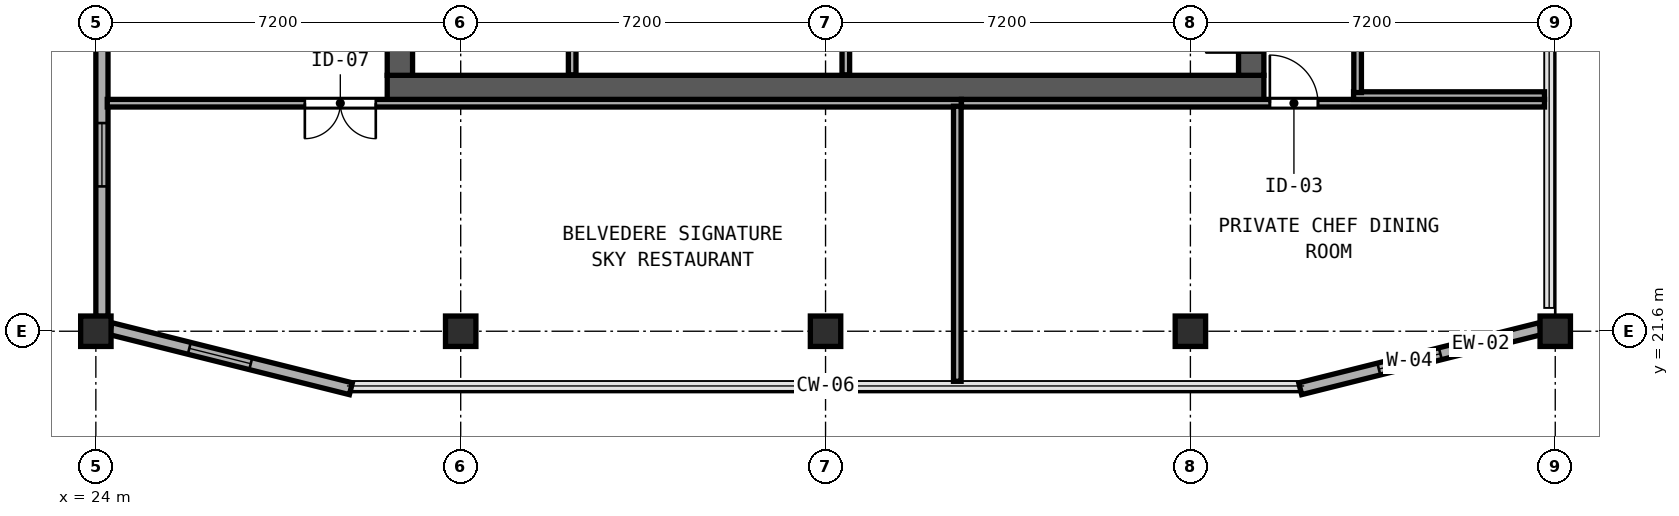
"""IFC4 building model, lengths in metres.
Left out: names, types, materials, properties, quantities, classifications, styles, units other than length and angle.
Written with IfcOpenShell. Run it as: python <this file> out.ifc"""

import sys

from ifc_helpers import new_model, si_unit, direction, frame, frame_2d, origin, origin_2d, place, context, subcontext, project, spatial, rectangle, hollow_rectangle, extrude, element, fill, save


model = new_model("IFC4")
c1 = context("Model", 3, precision=1e-05, world=origin(), true_north=direction((0.0, 1.0)))
c2 = subcontext(c1, "Body", "Model", "MODEL_VIEW")
j1 = project(units=[si_unit("LENGTHUNIT", "METRE"), si_unit("PLANEANGLEUNIT", "RADIAN")], contexts=[c1])
p1 = place(None, origin())
s1 = spatial("IfcSite", under=j1, at=p1, CompositionType="ELEMENT")
p2 = place(p1, origin())
s2 = spatial("IfcBuilding", under=s1, at=p2, CompositionType="ELEMENT")
p3 = place(p2, frame((0.0, 0.0, 313.4)))
s3 = spatial("IfcBuildingStorey", under=s2, at=p3, CompositionType="ELEMENT", Elevation=313.4)
p4 = place(p3, frame((29.75, 26.4, 0.0), z_axis=(0.0, 0.0, 1.0), x_axis=(1.0, 0.0, 0.0)))
e1 = element("IfcWall", 1, at=p4, inside=s3, PredefinedType="SHEAR", context=c2, shape_type="SweptSolid", body=[
    extrude(rectangle(XDim=17.3, YDim=0.5, at=frame_2d((8.65, 0.0))), origin(), (0.0, 0.0, 1.0), 4.56),
])
p5 = place(p3, frame((30.0, 26.65, 0.0), z_axis=(0.0, 0.0, 1.0), x_axis=(0.0, 1.0, 0.0)))
e2 = element("IfcWall", 2, at=p5, inside=s3, PredefinedType="SHEAR", context=c2, shape_type="SweptSolid", body=[
    extrude(rectangle(XDim=4.2, YDim=0.5, at=frame_2d((2.1, 0.0))), origin(), (0.0, 0.0, 1.0), 4.56),
])
p6 = place(p3, frame((46.8, 26.65, 0.0), z_axis=(0.0, 0.0, 1.0), x_axis=(0.0, 1.0, 0.0)))
e3 = element("IfcWall", 3, at=p6, inside=s3, PredefinedType="SHEAR", context=c2, shape_type="SweptSolid", body=[
    extrude(rectangle(XDim=4.2, YDim=0.5, at=frame_2d((2.1, 0.0))), origin(), (0.0, 0.0, 1.0), 4.56),
])
p7 = place(p6, frame((1.35, 0.0, 0.0), z_axis=(0.0, 0.0, 1.0), x_axis=(-1.0, 0.0, 0.0)))
e4 = element("IfcOpeningElement", 4, at=p7, cuts=e3, PredefinedType="OPENING", context=c2, shape_type="SweptSolid", body=[
    extrude(rectangle(XDim=0.9, YDim=2.1, at=frame_2d((0.45, 1.05))), frame((0.0, 0.26, 0.0), z_axis=(0.0, -1.0, 0.0), x_axis=(1.0, 0.0, 0.0)), (0.0, 0.0, 1.0), 0.52),
])
for number, where, z_axis, x_axis in (
    (5, (24.0, 21.6, 0.0), (0.0, 0.0, 1.0), (1.0, 0.0, 0.0)),
    (6, (52.8, 21.6, 0.0), (0.0, 0.0, 1.0), (1.0, 0.0, 0.0)),
    (7, (31.2, 21.6, 0.0), (0.0, 0.0, 1.0), (1.0, 0.0, 0.0)),
    (8, (45.6, 21.6, 0.0), (0.0, 0.0, 1.0), (1.0, 0.0, 0.0)),
    (9, (38.4, 21.6, 0.0), (0.0, 0.0, 1.0), (1.0, 0.0, 0.0)),
):
    element("IfcColumn", number, at=place(p3, frame(where, z_axis=z_axis, x_axis=x_axis)), inside=s3, PredefinedType="COLUMN", context=c2, shape_type="SweptSolid", body=[
        extrude(hollow_rectangle(XDim=0.6, YDim=0.6, WallThickness=0.024, at=origin_2d()), origin(), (0.0, 0.0, 1.0), 4.8),
    ])
p8 = place(p3, frame((47.767, 20.465, 0.0), z_axis=(0.0, 0.0, 1.0), x_axis=(0.970142500145, 0.242535625036, 0.0)))
e10 = element("IfcWall", 10, at=p8, inside=s3, PredefinedType="SOLIDWALL", context=c2, shape_type="SweptSolid", body=[
    extrude(rectangle(XDim=4.887, YDim=0.24, at=frame_2d((2.444, 0.0))), origin(), (0.0, 0.0, 1.0), 4.155),
])
p9 = place(p8, frame((1.6, 0.0, 0.85)))
e11 = element("IfcOpeningElement", 11, at=p9, cuts=e10, PredefinedType="OPENING", context=c2, shape_type="SweptSolid", body=[
    extrude(rectangle(XDim=1.25, YDim=1.95, at=frame_2d((0.625, 0.975))), frame((0.0, 0.13, 0.0), z_axis=(0.0, -1.0, 0.0), x_axis=(1.0, 0.0, 0.0)), (0.0, 0.0, 1.0), 0.26),
])
p10 = place(p3, frame((24.12, 27.308, 0.0), z_axis=(0.0, 0.0, 1.0), x_axis=(0.0, -1.0, 0.0)))
e12 = element("IfcWall", 12, at=p10, inside=s3, PredefinedType="SOLIDWALL", context=c2, shape_type="SweptSolid", body=[
    extrude(rectangle(XDim=5.416, YDim=0.24, at=frame_2d((2.708, 0.0))), origin(), (0.0, 0.0, 1.0), 4.155),
])
p11 = place(p10, frame((1.6, 0.0, 0.85)))
e13 = element("IfcOpeningElement", 13, at=p11, cuts=e12, PredefinedType="OPENING", context=c2, shape_type="SweptSolid", body=[
    extrude(rectangle(XDim=1.25, YDim=1.95, at=frame_2d((0.625, 0.975))), frame((0.0, 0.13, 0.0), z_axis=(0.0, -1.0, 0.0), x_axis=(1.0, 0.0, 0.0)), (0.0, 0.0, 1.0), 0.26),
])
p12 = place(p3, frame((24.292, 21.651, 0.0), z_axis=(0.0, 0.0, 1.0), x_axis=(0.970142500145, -0.242535625036, 0.0)))
e14 = element("IfcWall", 14, at=p12, inside=s3, PredefinedType="SOLIDWALL", context=c2, shape_type="SweptSolid", body=[
    extrude(rectangle(XDim=4.887, YDim=0.24, at=frame_2d((2.444, 0.0))), origin(), (0.0, 0.0, 1.0), 4.155),
])
p13 = place(p12, frame((1.6, 0.0, 0.85)))
e15 = element("IfcOpeningElement", 15, at=p13, cuts=e14, PredefinedType="OPENING", context=c2, shape_type="SweptSolid", body=[
    extrude(rectangle(XDim=1.25, YDim=1.95, at=frame_2d((0.625, 0.975))), frame((0.0, 0.13, 0.0), z_axis=(0.0, -1.0, 0.0), x_axis=(1.0, 0.0, 0.0)), (0.0, 0.0, 1.0), 0.26),
])
p14 = place(p3, frame((38.8, 26.66, 0.0), z_axis=(0.0, 0.0, 1.0), x_axis=(0.0, 1.0, 0.0)))
e16 = element("IfcWall", 16, at=p14, inside=s3, PredefinedType="SOLIDWALL", context=c2, shape_type="SweptSolid", body=[
    extrude(rectangle(XDim=4.075, YDim=0.15, at=frame_2d((2.038, 0.0))), origin(), (0.0, 0.0, 1.0), 4.56),
])
p15 = place(p3, frame((33.4, 26.66, 0.0), z_axis=(0.0, 0.0, 1.0), x_axis=(0.0, 1.0, 0.0)))
e17 = element("IfcWall", 17, at=p15, inside=s3, PredefinedType="PARTITIONING", context=c2, shape_type="SweptSolid", body=[
    extrude(rectangle(XDim=4.075, YDim=0.15, at=frame_2d((2.038, 0.0))), origin(), (0.0, 0.0, 1.0), 4.56),
])
p16 = place(p3, frame((24.225, 26.1, 0.0), z_axis=(0.0, 0.0, 1.0), x_axis=(1.0, 0.0, 0.0)))
e18 = element("IfcWall", 18, at=p16, inside=s3, PredefinedType="PARTITIONING", context=c2, shape_type="SweptSolid", body=[
    extrude(rectangle(XDim=16.855, YDim=0.15, at=frame_2d((8.427, 0.0))), origin(), (0.0, 0.0, 1.0), 4.56),
])
p17 = place(p16, frame((5.299, 0.0, 0.0), z_axis=(0.0, 0.0, 1.0), x_axis=(-1.0, 0.0, 0.0)))
e19 = element("IfcOpeningElement", 19, at=p17, cuts=e18, PredefinedType="OPENING", context=c2, shape_type="SweptSolid", body=[
    extrude(rectangle(XDim=1.4, YDim=2.18, at=frame_2d((0.7, 1.09))), frame((0.0, 0.085, 0.0), z_axis=(0.0, -1.0, 0.0), x_axis=(1.0, 0.0, 0.0)), (0.0, 0.0, 1.0), 0.17),
])
p18 = place(p3, frame((41.0, 20.612, 0.0), z_axis=(0.0, 0.0, 1.0), x_axis=(0.0, 1.0, 0.0)))
e20 = element("IfcWall", 20, at=p18, inside=s3, PredefinedType="PARTITIONING", context=c2, shape_type="SweptSolid", body=[
    extrude(rectangle(XDim=5.428, YDim=0.15, at=frame_2d((2.714, 0.0))), origin(), (0.0, 0.0, 1.0), 4.56),
])
p19 = place(p3, frame((41.082, 26.1, 0.0), z_axis=(0.0, 0.0, 1.0), x_axis=(1.0, 0.0, 0.0)))
e21 = element("IfcWall", 21, at=p19, inside=s3, PredefinedType="PARTITIONING", context=c2, shape_type="SweptSolid", body=[
    extrude(rectangle(XDim=11.506, YDim=0.15, at=frame_2d((5.753, 0.0))), origin(), (0.0, 0.0, 1.0), 4.56),
])
p20 = place(p19, frame((7.036, 0.0, 0.0), z_axis=(0.0, 0.0, 1.0), x_axis=(-1.0, 0.0, 0.0)))
e22 = element("IfcOpeningElement", 22, at=p20, cuts=e21, PredefinedType="OPENING", context=c2, shape_type="SweptSolid", body=[
    extrude(rectangle(XDim=0.95, YDim=2.12, at=frame_2d((0.475, 1.06))), frame((0.0, 0.085, 0.0), z_axis=(0.0, -1.0, 0.0), x_axis=(1.0, 0.0, 0.0)), (0.0, 0.0, 1.0), 0.17),
])
p21 = place(p3, frame((48.82, 26.25, 0.0), z_axis=(0.0, 0.0, 1.0), x_axis=(1.0, 0.0, 0.0)))
e23 = element("IfcWall", 23, at=p21, inside=s3, PredefinedType="PARTITIONING", context=c2, shape_type="SweptSolid", body=[
    extrude(rectangle(XDim=3.768, YDim=0.15, at=frame_2d((1.884, 0.0))), origin(), (0.0, 0.0, 1.0), 4.56),
])
p22 = place(p3, frame((48.9, 26.31, 0.0), z_axis=(0.0, 0.0, 1.0), x_axis=(0.0, 1.0, 0.0)))
e24 = element("IfcWall", 24, at=p22, inside=s3, PredefinedType="PARTITIONING", context=c2, shape_type="SweptSolid", body=[
    extrude(rectangle(XDim=21.68, YDim=0.15, at=frame_2d((10.84, 0.0))), origin(), (0.0, 0.0, 1.0), 4.56),
])
p23 = place(p22, frame((5.86, 0.0, 0.0)))
e25 = element("IfcOpeningElement", 25, at=p23, cuts=e24, PredefinedType="OPENING", context=c2, shape_type="SweptSolid", body=[
    extrude(rectangle(XDim=0.95, YDim=2.12, at=frame_2d((0.475, 1.06))), frame((0.0, 0.085, 0.0), z_axis=(0.0, -1.0, 0.0), x_axis=(1.0, 0.0, 0.0)), (0.0, 0.0, 1.0), 0.17),
])
p24 = place(p9, origin())
e26 = element("IfcWindow", 26, at=p24, inside=s3, PartitioningType="SINGLE_PANEL", PredefinedType="WINDOW", context=c2, shape_type="SweptSolid", body=[
    extrude(rectangle(XDim=1.25, YDim=1.95, at=frame_2d((0.625, 0.975))), frame((0.0, 0.03, 0.0), z_axis=(0.0, -1.0, 0.0), x_axis=(1.0, 0.0, 0.0)), (0.0, 0.0, 1.0), 0.06),
])
fill(e11, e26)
p25 = place(p11, origin())
e27 = element("IfcWindow", 27, at=p25, inside=s3, PartitioningType="SINGLE_PANEL", PredefinedType="WINDOW", context=c2, shape_type="SweptSolid", body=[
    extrude(rectangle(XDim=1.25, YDim=1.95, at=frame_2d((0.625, 0.975))), frame((0.0, 0.03, 0.0), z_axis=(0.0, -1.0, 0.0), x_axis=(1.0, 0.0, 0.0)), (0.0, 0.0, 1.0), 0.06),
])
fill(e13, e27)
p26 = place(p13, origin())
e28 = element("IfcWindow", 28, at=p26, inside=s3, PartitioningType="SINGLE_PANEL", PredefinedType="WINDOW", context=c2, shape_type="SweptSolid", body=[
    extrude(rectangle(XDim=1.25, YDim=1.95, at=frame_2d((0.625, 0.975))), frame((0.0, 0.03, 0.0), z_axis=(0.0, -1.0, 0.0), x_axis=(1.0, 0.0, 0.0)), (0.0, 0.0, 1.0), 0.06),
])
fill(e15, e28)
p27 = place(p7, origin())
e29 = element("IfcDoor", 29, at=p27, inside=s3, OperationType="SINGLE_SWING_RIGHT", PredefinedType="DOOR", context=c2, shape_type="SweptSolid", body=[
    extrude(rectangle(XDim=0.9, YDim=2.1, at=frame_2d((0.45, 1.05))), frame((0.0, -0.135, 0.0), z_axis=(0.0, -1.0, 0.0), x_axis=(1.0, 0.0, 0.0)), (0.0, 0.0, 1.0), 0.05),
])
fill(e4, e29)
p28 = place(p17, origin())
e30 = element("IfcDoor", 30, at=p28, inside=s3, OperationType="DOUBLE_DOOR_SINGLE_SWING", PredefinedType="DOOR", context=c2, shape_type="SweptSolid", body=[
    extrude(rectangle(XDim=1.4, YDim=2.18, at=frame_2d((0.7, 1.09))), frame((0.0, 0.025, 0.0), z_axis=(0.0, -1.0, 0.0), x_axis=(1.0, 0.0, 0.0)), (0.0, 0.0, 1.0), 0.05),
])
fill(e19, e30)
p29 = place(p20, origin())
e31 = element("IfcDoor", 31, at=p29, inside=s3, OperationType="SINGLE_SWING_RIGHT", PredefinedType="DOOR", context=c2, shape_type="SweptSolid", body=[
    extrude(rectangle(XDim=0.95, YDim=2.12, at=frame_2d((0.475, 1.06))), frame((0.0, 0.025, 0.0), z_axis=(0.0, -1.0, 0.0), x_axis=(1.0, 0.0, 0.0)), (0.0, 0.0, 1.0), 0.05),
])
fill(e22, e31)
save(model, sys.argv[1])
